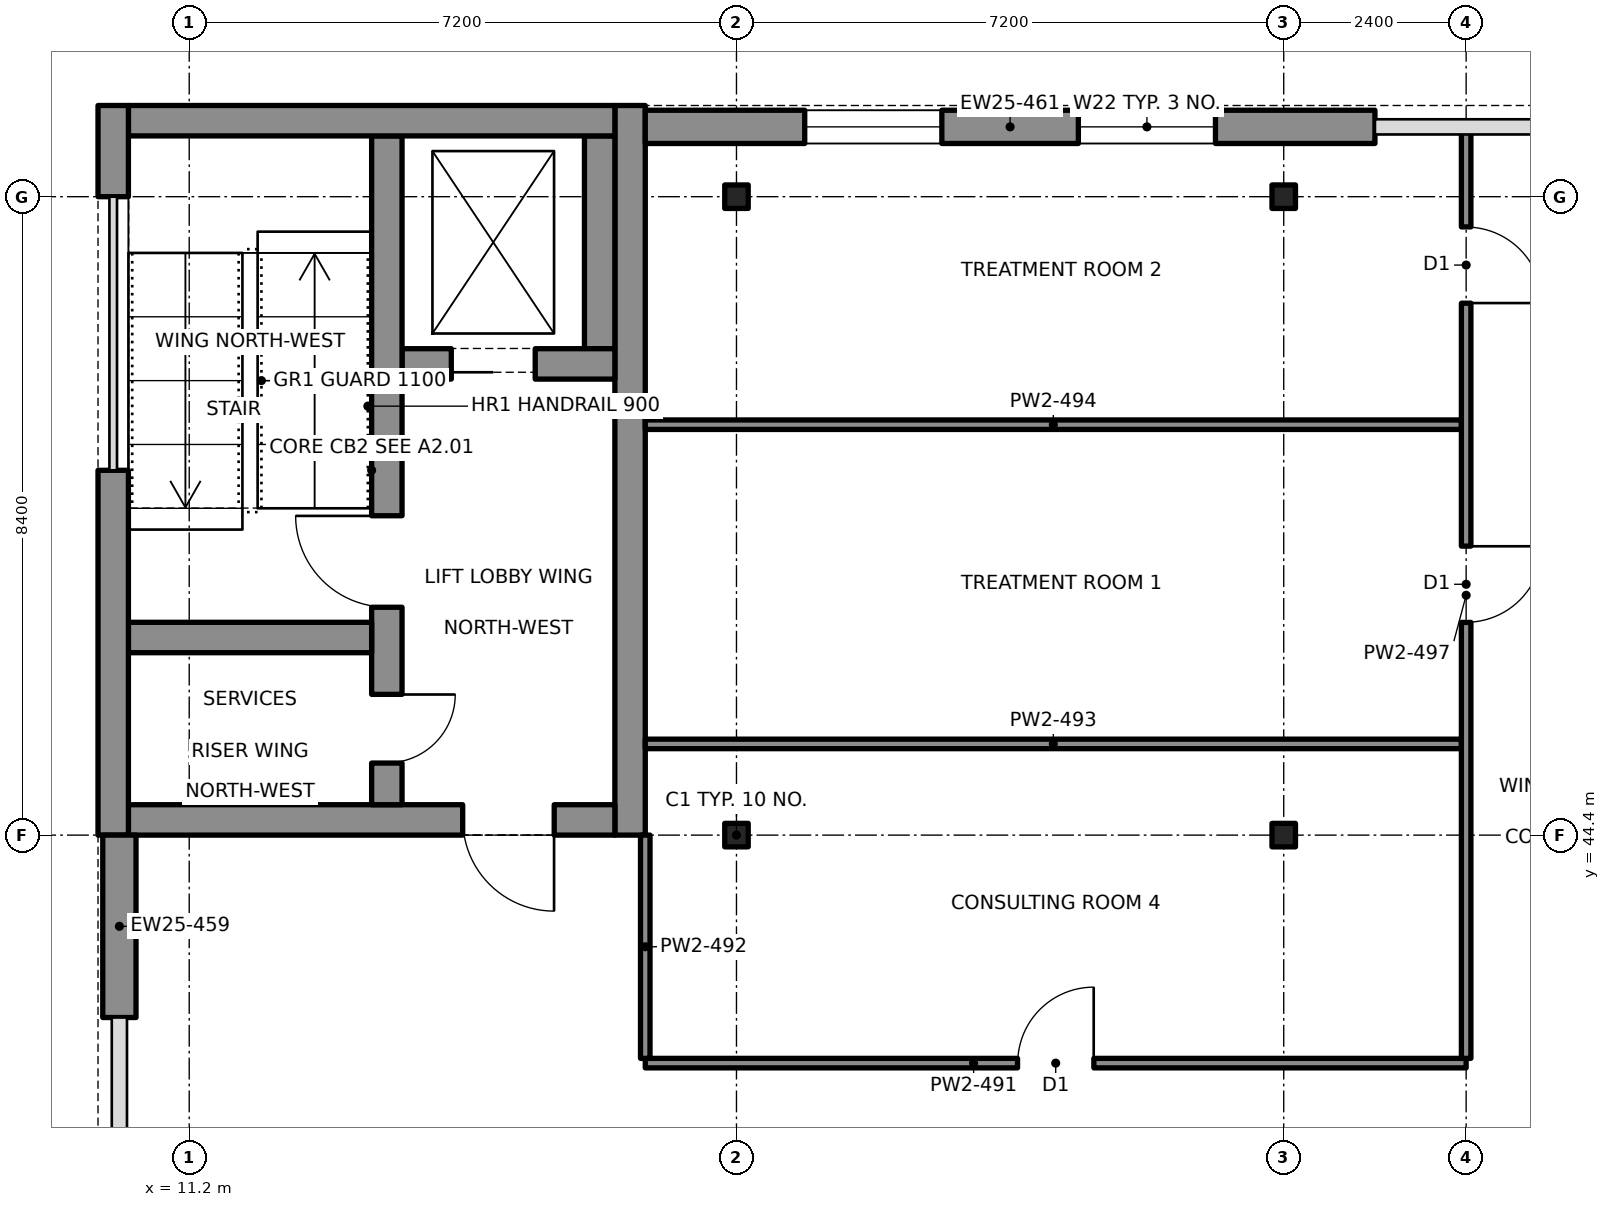
"""IFC4 building model, lengths in metres.
Left out: names, types, materials, properties, quantities, classifications, styles, units other than length and angle.
Written with IfcOpenShell. Run it as: python <this file> out.ifc"""

import sys

from ifc_helpers import new_model, si_unit, direction, frame, frame_2d, origin, origin_2d, place, context, subcontext, project, spatial, rectangle, i_section, extrude, element, fill, save


model = new_model("IFC4")
c1 = context("Model", 3, precision=1e-05, world=origin(), true_north=direction((0.0, 1.0)))
c2 = subcontext(c1, "Body", "Model", "MODEL_VIEW")
j1 = project(units=[si_unit("LENGTHUNIT", "METRE"), si_unit("PLANEANGLEUNIT", "RADIAN")], contexts=[c1])
p1 = place(None, origin())
s1 = spatial("IfcSite", under=j1, at=p1, CompositionType="ELEMENT")
p2 = place(p1, origin())
s2 = spatial("IfcBuilding", under=s1, at=p2, CompositionType="ELEMENT")
p3 = place(p2, frame((0.0, 0.0, 4.4)))
s3 = spatial("IfcBuildingStorey", under=s2, at=p3, CompositionType="ELEMENT", Elevation=4.4)
for number, where, z_axis, x_axis in (
    (1, (18.4, 44.4, 0.0), (0.0, 0.0, 1.0), (1.0, 0.0, 0.0)),
    (2, (18.4, 52.8, 0.0), (0.0, 0.0, 1.0), (1.0, 0.0, 0.0)),
    (3, (25.6, 44.4, 0.0), (0.0, 0.0, 1.0), (1.0, 0.0, 0.0)),
    (4, (25.6, 52.8, 0.0), (0.0, 0.0, 1.0), (1.0, 0.0, 0.0)),
):
    element("IfcColumn", number, at=place(p3, frame(where, z_axis=z_axis, x_axis=x_axis)), inside=s3, PredefinedType="COLUMN", context=c2, shape_type="SweptSolid", body=[
        extrude(i_section(OverallWidth=0.309, OverallDepth=0.323, WebThickness=0.014, FlangeThickness=0.023, at=origin_2d()), origin(), (0.0, 0.0, 1.0), 4.4),
    ])
p4 = place(p3, frame((17.2, 53.719, 0.0), z_axis=(0.0, 0.0, 1.0), x_axis=(1.0, 0.0, 0.0)))
e5 = element("IfcWall", 5, at=p4, inside=s3, PredefinedType="SOLIDWALL", context=c2, shape_type="SweptSolid", body=[
    extrude(rectangle(XDim=9.6, YDim=0.438, at=frame_2d((4.8, 0.0))), origin(), (0.0, 0.0, 1.0), 4.4),
])
p5 = place(p4, frame((2.1, 0.0, 0.75)))
e6 = element("IfcOpeningElement", 6, at=p5, cuts=e5, PredefinedType="OPENING", context=c2, shape_type="SweptSolid", body=[
    extrude(rectangle(XDim=1.8, YDim=2.8, at=frame_2d((0.9, 1.4))), frame((0.0, 0.229, 0.0), z_axis=(0.0, -1.0, 0.0), x_axis=(1.0, 0.0, 0.0)), (0.0, 0.0, 1.0), 0.458),
])
p6 = place(p4, frame((5.7, 0.0, 0.75)))
e7 = element("IfcOpeningElement", 7, at=p6, cuts=e5, PredefinedType="OPENING", context=c2, shape_type="SweptSolid", body=[
    extrude(rectangle(XDim=1.8, YDim=2.8, at=frame_2d((0.9, 1.4))), frame((0.0, 0.229, 0.0), z_axis=(0.0, -1.0, 0.0), x_axis=(1.0, 0.0, 0.0)), (0.0, 0.0, 1.0), 0.458),
])
p7 = place(p3, frame((10.281, 42.0, 0.0), z_axis=(0.0, 0.0, 1.0), x_axis=(0.0, 1.0, 0.0)))
e8 = element("IfcWall", 8, at=p7, inside=s3, PredefinedType="SOLIDWALL", context=c2, shape_type="SweptSolid", body=[
    extrude(rectangle(XDim=2.4, YDim=0.438, at=frame_2d((1.2, 0.0))), origin(), (0.0, 0.0, 1.0), 4.4),
])
p8 = place(p3, frame((10.2, 44.4, 0.0), z_axis=(0.0, 0.0, 1.0), x_axis=(0.0, 1.0, 0.0)))
e9 = element("IfcWall", 9, at=p8, inside=s3, PredefinedType="SHEAR", context=c2, shape_type="SweptSolid", body=[
    extrude(rectangle(XDim=4.8, YDim=0.4, at=frame_2d((2.4, 0.0))), origin(), (0.0, 0.0, 1.0), 4.4),
])
p9 = place(p3, frame((10.2, 52.8, 0.0), z_axis=(0.0, 0.0, 1.0), x_axis=(0.0, 1.0, 0.0)))
e10 = element("IfcWall", 10, at=p9, inside=s3, PredefinedType="SHEAR", context=c2, shape_type="SweptSolid", body=[
    extrude(rectangle(XDim=1.2, YDim=0.4, at=frame_2d((0.6, 0.0))), origin(), (0.0, 0.0, 1.0), 4.4),
])
p10 = place(p3, frame((17.0, 44.4, 0.0), z_axis=(0.0, 0.0, 1.0), x_axis=(0.0, 1.0, 0.0)))
e11 = element("IfcWall", 11, at=p10, inside=s3, PredefinedType="SHEAR", context=c2, shape_type="SweptSolid", body=[
    extrude(rectangle(XDim=9.6, YDim=0.4, at=frame_2d((4.8, 0.0))), origin(), (0.0, 0.0, 1.0), 4.4),
])
p11 = place(p3, frame((10.4, 53.8, 0.0), z_axis=(0.0, 0.0, 1.0), x_axis=(1.0, 0.0, 0.0)))
e12 = element("IfcWall", 12, at=p11, inside=s3, PredefinedType="SHEAR", context=c2, shape_type="SweptSolid", body=[
    extrude(rectangle(XDim=6.4, YDim=0.4, at=frame_2d((3.2, 0.0))), origin(), (0.0, 0.0, 1.0), 4.4),
])
p12 = place(p3, frame((10.4, 44.6, 0.0), z_axis=(0.0, 0.0, 1.0), x_axis=(1.0, 0.0, 0.0)))
e13 = element("IfcWall", 13, at=p12, inside=s3, PredefinedType="SHEAR", context=c2, shape_type="SweptSolid", body=[
    extrude(rectangle(XDim=6.4, YDim=0.4, at=frame_2d((3.2, 0.0))), origin(), (0.0, 0.0, 1.0), 4.4),
])
p13 = place(p12, frame((4.4, 0.0, 0.0)))
e14 = element("IfcOpeningElement", 14, at=p13, cuts=e13, PredefinedType="OPENING", context=c2, shape_type="SweptSolid", body=[
    extrude(rectangle(XDim=1.2, YDim=2.1, at=frame_2d((0.6, 1.05))), frame((0.0, 0.21, 0.0), z_axis=(0.0, -1.0, 0.0), x_axis=(1.0, 0.0, 0.0)), (0.0, 0.0, 1.0), 0.42),
])
p14 = place(p3, frame((13.8, 44.8, 0.0), z_axis=(0.0, 0.0, 1.0), x_axis=(0.0, 1.0, 0.0)))
e15 = element("IfcWall", 15, at=p14, inside=s3, PredefinedType="SHEAR", context=c2, shape_type="SweptSolid", body=[
    extrude(rectangle(XDim=8.8, YDim=0.4, at=frame_2d((4.4, 0.0))), origin(), (0.0, 0.0, 1.0), 4.4),
])
p15 = place(p14, frame((2.6, 0.0, 0.0)))
e16 = element("IfcOpeningElement", 16, at=p15, cuts=e15, PredefinedType="OPENING", context=c2, shape_type="SweptSolid", body=[
    extrude(rectangle(XDim=1.2, YDim=2.1, at=frame_2d((0.6, 1.05))), frame((0.0, 0.21, 0.0), z_axis=(0.0, -1.0, 0.0), x_axis=(1.0, 0.0, 0.0)), (0.0, 0.0, 1.0), 0.42),
])
p16 = place(p14, frame((0.55, 0.0, 0.0)))
e17 = element("IfcOpeningElement", 17, at=p16, cuts=e15, PredefinedType="OPENING", context=c2, shape_type="SweptSolid", body=[
    extrude(rectangle(XDim=0.9, YDim=2.1, at=frame_2d((0.45, 1.05))), frame((0.0, 0.21, 0.0), z_axis=(0.0, -1.0, 0.0), x_axis=(1.0, 0.0, 0.0)), (0.0, 0.0, 1.0), 0.42),
])
p17 = place(p3, frame((10.4, 47.0, 0.0), z_axis=(0.0, 0.0, 1.0), x_axis=(1.0, 0.0, 0.0)))
e18 = element("IfcWall", 18, at=p17, inside=s3, PredefinedType="SHEAR", context=c2, shape_type="SweptSolid", body=[
    extrude(rectangle(XDim=3.2, YDim=0.4, at=frame_2d((1.6, 0.0))), origin(), (0.0, 0.0, 1.0), 4.4),
])
p18 = place(p3, frame((14.0, 50.6, 0.0), z_axis=(0.0, 0.0, 1.0), x_axis=(1.0, 0.0, 0.0)))
e19 = element("IfcWall", 19, at=p18, inside=s3, PredefinedType="SHEAR", context=c2, shape_type="SweptSolid", body=[
    extrude(rectangle(XDim=2.8, YDim=0.4, at=frame_2d((1.4, 0.0))), origin(), (0.0, 0.0, 1.0), 4.4),
])
p19 = place(p18, frame((0.65, 0.0, 0.0)))
e20 = element("IfcOpeningElement", 20, at=p19, cuts=e19, PredefinedType="OPENING", context=c2, shape_type="SweptSolid", body=[
    extrude(rectangle(XDim=1.1, YDim=2.1, at=frame_2d((0.55, 1.05))), frame((0.0, 0.21, 0.0), z_axis=(0.0, -1.0, 0.0), x_axis=(1.0, 0.0, 0.0)), (0.0, 0.0, 1.0), 0.42),
])
p20 = place(p3, frame((16.6, 50.8, 0.0), z_axis=(0.0, 0.0, 1.0), x_axis=(0.0, 1.0, 0.0)))
e21 = element("IfcWall", 21, at=p20, inside=s3, PredefinedType="SHEAR", context=c2, shape_type="SweptSolid", body=[
    extrude(rectangle(XDim=2.8, YDim=0.4, at=frame_2d((1.4, 0.0))), origin(), (0.0, 0.0, 1.0), 4.4),
])
p21 = place(p3, frame((17.2, 41.4, 0.0), z_axis=(0.0, 0.0, 1.0), x_axis=(1.0, 0.0, 0.0)))
e22 = element("IfcWall", 22, at=p21, inside=s3, PredefinedType="PARTITIONING", context=c2, shape_type="SweptSolid", body=[
    extrude(rectangle(XDim=10.8, YDim=0.125, at=frame_2d((5.4, 0.0))), origin(), (0.0, 0.0, 1.0), 3.65),
])
p22 = place(p21, frame((4.9, 0.0, 0.0)))
e23 = element("IfcOpeningElement", 23, at=p22, cuts=e22, PredefinedType="OPENING", context=c2, shape_type="SweptSolid", body=[
    extrude(rectangle(XDim=1.0, YDim=2.1, at=frame_2d((0.5, 1.05))), frame((0.0, 0.073, 0.0), z_axis=(0.0, -1.0, 0.0), x_axis=(1.0, 0.0, 0.0)), (0.0, 0.0, 1.0), 0.145),
])
for number, where, z_axis, x_axis in (
    (24, (17.2, 45.6, 0.0), (0.0, 0.0, 1.0), (1.0, 0.0, 0.0)),
    (25, (17.2, 49.8, 0.0), (0.0, 0.0, 1.0), (1.0, 0.0, 0.0)),
):
    element("IfcWall", number, at=place(p3, frame(where, z_axis=z_axis, x_axis=x_axis)), inside=s3, PredefinedType="PARTITIONING", context=c2, shape_type="SweptSolid", body=[
        extrude(rectangle(XDim=10.738, YDim=0.125, at=frame_2d((5.369, 0.0))), origin(), (0.0, 0.0, 1.0), 3.65),
    ])
p23 = place(p3, frame((17.2, 41.462, 0.0), z_axis=(0.0, 0.0, 1.0), x_axis=(0.0, 1.0, 0.0)))
e26 = element("IfcWall", 26, at=p23, inside=s3, PredefinedType="PARTITIONING", context=c2, shape_type="SweptSolid", body=[
    extrude(rectangle(XDim=2.938, YDim=0.125, at=frame_2d((1.469, 0.0))), origin(), (0.0, 0.0, 1.0), 3.65),
])
p24 = place(p3, frame((28.0, 41.462, 0.0), z_axis=(0.0, 0.0, 1.0), x_axis=(0.0, 1.0, 0.0)))
e27 = element("IfcWall", 27, at=p24, inside=s3, PredefinedType="PARTITIONING", context=c2, shape_type="SweptSolid", body=[
    extrude(rectangle(XDim=12.186, YDim=0.125, at=frame_2d((6.093, 0.0))), origin(), (0.0, 0.0, 1.0), 3.65),
])
p25 = place(p24, frame((5.738, 0.0, 0.0)))
e28 = element("IfcOpeningElement", 28, at=p25, cuts=e27, PredefinedType="OPENING", context=c2, shape_type="SweptSolid", body=[
    extrude(rectangle(XDim=1.0, YDim=2.1, at=frame_2d((0.5, 1.05))), frame((0.0, 0.073, 0.0), z_axis=(0.0, -1.0, 0.0), x_axis=(1.0, 0.0, 0.0)), (0.0, 0.0, 1.0), 0.145),
])
p26 = place(p24, frame((9.938, 0.0, 0.0)))
e29 = element("IfcOpeningElement", 29, at=p26, cuts=e27, PredefinedType="OPENING", context=c2, shape_type="SweptSolid", body=[
    extrude(rectangle(XDim=1.0, YDim=2.1, at=frame_2d((0.5, 1.05))), frame((0.0, 0.073, 0.0), z_axis=(0.0, -1.0, 0.0), x_axis=(1.0, 0.0, 0.0)), (0.0, 0.0, 1.0), 0.145),
])
p27 = place(p5, origin())
e30 = element("IfcWindow", 30, at=p27, inside=s3, PartitioningType="SINGLE_PANEL", PredefinedType="WINDOW", context=c2, shape_type="SweptSolid", body=[
    extrude(rectangle(XDim=1.8, YDim=2.8, at=frame_2d((0.9, 1.4))), frame((0.0, 0.03, 0.0), z_axis=(0.0, -1.0, 0.0), x_axis=(1.0, 0.0, 0.0)), (0.0, 0.0, 1.0), 0.06),
])
fill(e6, e30)
p28 = place(p6, origin())
e31 = element("IfcWindow", 31, at=p28, inside=s3, PartitioningType="SINGLE_PANEL", PredefinedType="WINDOW", context=c2, shape_type="SweptSolid", body=[
    extrude(rectangle(XDim=1.8, YDim=2.8, at=frame_2d((0.9, 1.4))), frame((0.0, 0.03, 0.0), z_axis=(0.0, -1.0, 0.0), x_axis=(1.0, 0.0, 0.0)), (0.0, 0.0, 1.0), 0.06),
])
fill(e7, e31)
p29 = place(p13, origin())
e32 = element("IfcDoor", 32, at=p29, inside=s3, OperationType="SINGLE_SWING_RIGHT", PredefinedType="DOOR", context=c2, shape_type="SweptSolid", body=[
    extrude(rectangle(XDim=1.2, YDim=2.1, at=frame_2d((0.6, 1.05))), frame((0.0, 0.025, 0.0), z_axis=(0.0, -1.0, 0.0), x_axis=(1.0, 0.0, 0.0)), (0.0, 0.0, 1.0), 0.05),
])
fill(e14, e32)
p30 = place(p15, origin())
e33 = element("IfcDoor", 33, at=p30, inside=s3, OperationType="SINGLE_SWING_RIGHT", PredefinedType="DOOR", context=c2, shape_type="SweptSolid", body=[
    extrude(rectangle(XDim=1.2, YDim=2.1, at=frame_2d((0.6, 1.05))), frame((0.0, 0.025, 0.0), z_axis=(0.0, -1.0, 0.0), x_axis=(1.0, 0.0, 0.0)), (0.0, 0.0, 1.0), 0.05),
])
fill(e16, e33)
p31 = place(p16, origin())
e34 = element("IfcDoor", 34, at=p31, inside=s3, OperationType="SINGLE_SWING_RIGHT", PredefinedType="DOOR", context=c2, shape_type="SweptSolid", body=[
    extrude(rectangle(XDim=0.9, YDim=2.1, at=frame_2d((0.45, 1.05))), frame((0.0, 0.025, 0.0), z_axis=(0.0, -1.0, 0.0), x_axis=(1.0, 0.0, 0.0)), (0.0, 0.0, 1.0), 0.05),
])
fill(e17, e34)
p32 = place(p19, origin())
e35 = element("IfcDoor", 35, at=p32, inside=s3, OperationType="SLIDING_TO_RIGHT", PredefinedType="DOOR", context=c2, shape_type="SweptSolid", body=[
    extrude(rectangle(XDim=1.1, YDim=2.1, at=frame_2d((0.55, 1.05))), frame((0.0, 0.025, 0.0), z_axis=(0.0, -1.0, 0.0), x_axis=(1.0, 0.0, 0.0)), (0.0, 0.0, 1.0), 0.05),
])
fill(e20, e35)
p33 = place(p22, origin())
e36 = element("IfcDoor", 36, at=p33, inside=s3, OperationType="SINGLE_SWING_RIGHT", PredefinedType="DOOR", context=c2, shape_type="SweptSolid", body=[
    extrude(rectangle(XDim=1.0, YDim=2.1, at=frame_2d((0.5, 1.05))), frame((0.0, 0.025, 0.0), z_axis=(0.0, -1.0, 0.0), x_axis=(1.0, 0.0, 0.0)), (0.0, 0.0, 1.0), 0.05),
])
fill(e23, e36)
p34 = place(p25, origin())
e37 = element("IfcDoor", 37, at=p34, inside=s3, OperationType="SINGLE_SWING_RIGHT", PredefinedType="DOOR", context=c2, shape_type="SweptSolid", body=[
    extrude(rectangle(XDim=1.0, YDim=2.1, at=frame_2d((0.5, 1.05))), frame((0.0, 0.025, 0.0), z_axis=(0.0, -1.0, 0.0), x_axis=(1.0, 0.0, 0.0)), (0.0, 0.0, 1.0), 0.05),
])
fill(e28, e37)
p35 = place(p26, origin())
e38 = element("IfcDoor", 38, at=p35, inside=s3, OperationType="SINGLE_SWING_LEFT", PredefinedType="DOOR", context=c2, shape_type="SweptSolid", body=[
    extrude(rectangle(XDim=1.0, YDim=2.1, at=frame_2d((0.5, 1.05))), frame((0.0, 0.025, 0.0), z_axis=(0.0, -1.0, 0.0), x_axis=(1.0, 0.0, 0.0)), (0.0, 0.0, 1.0), 0.05),
])
fill(e29, e38)
save(model, sys.argv[1])
